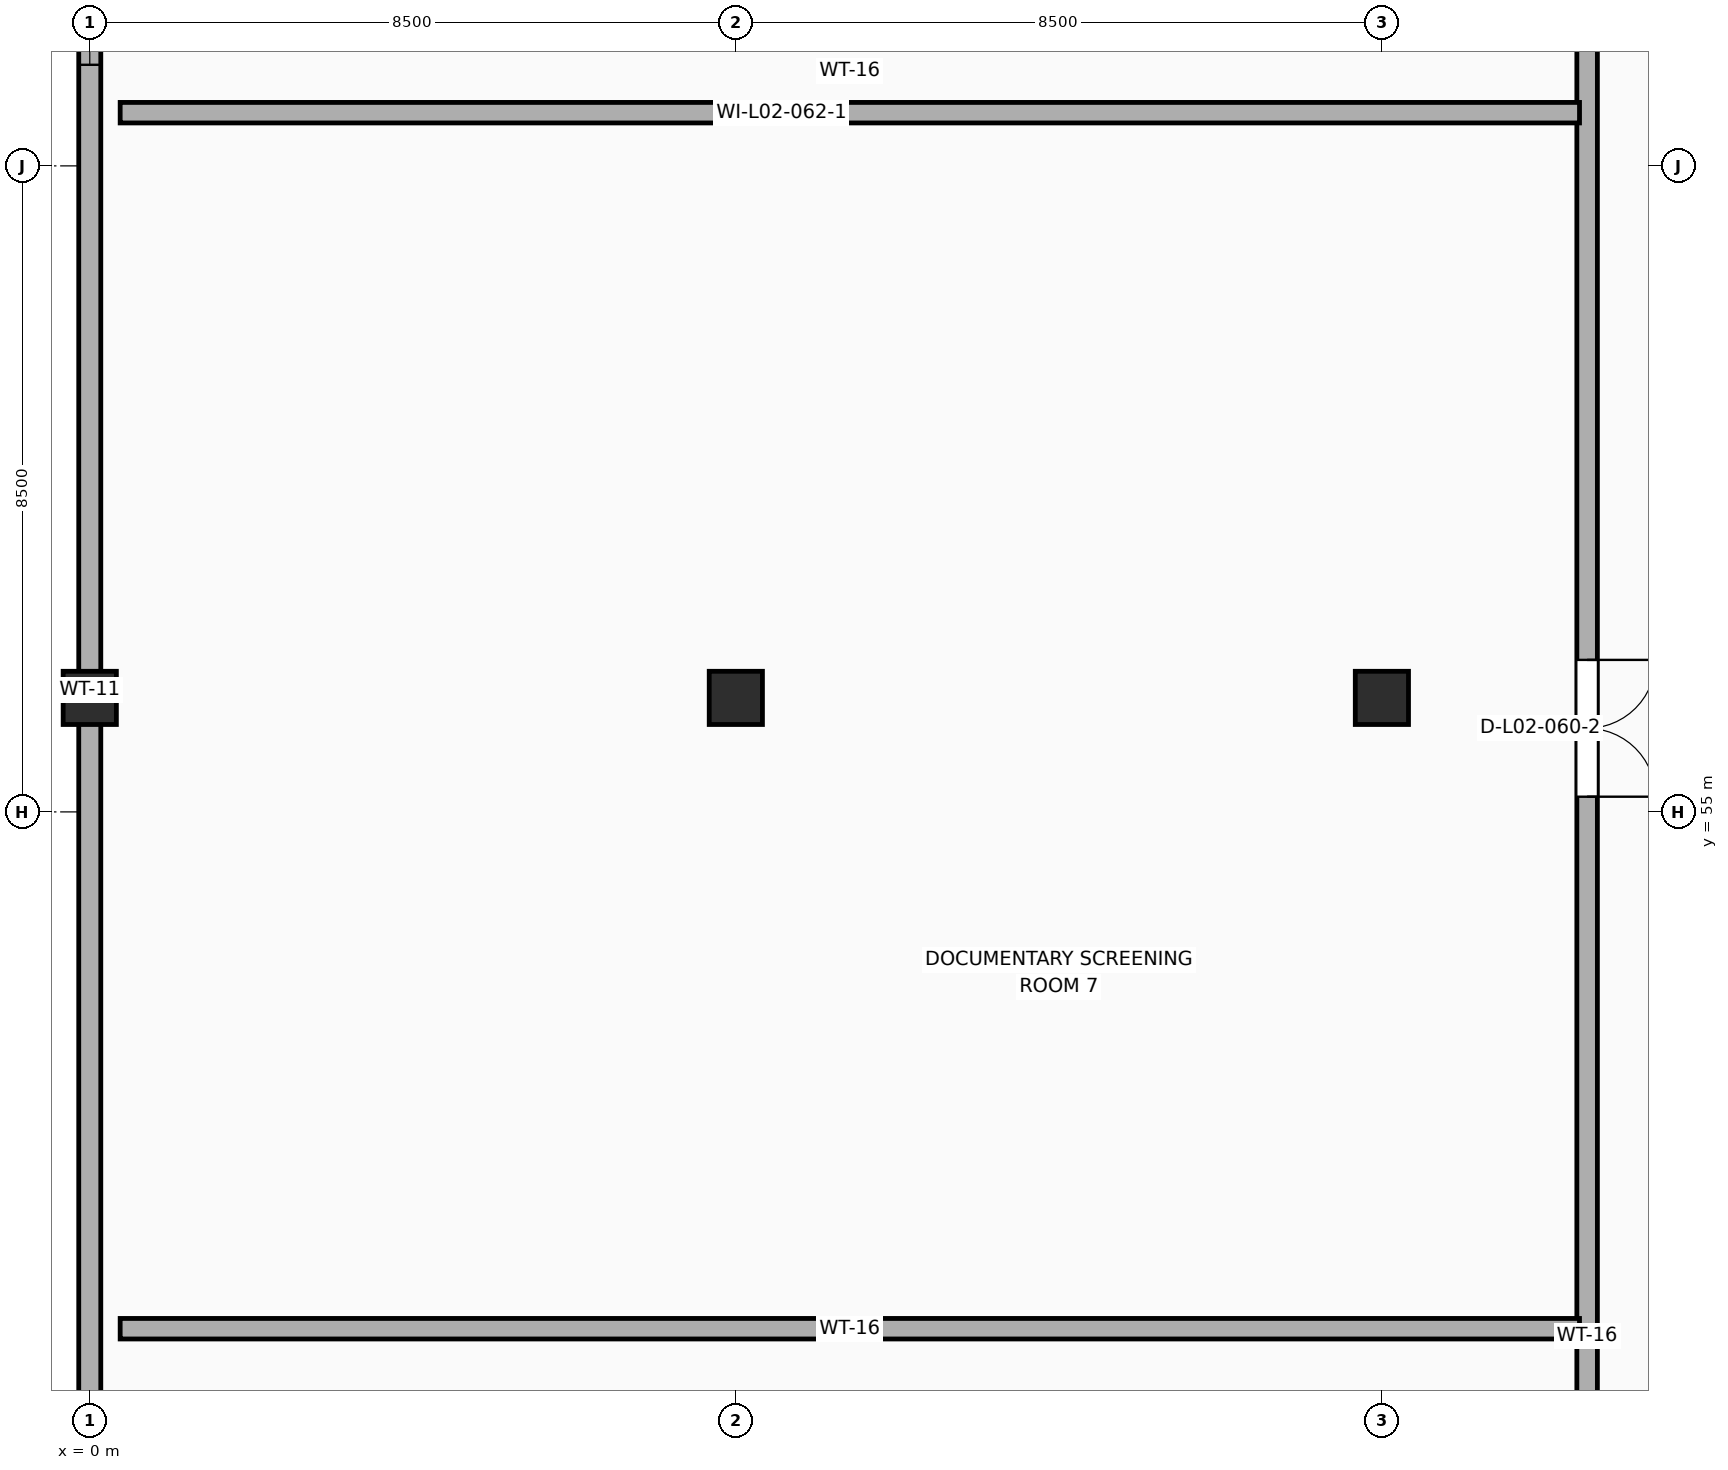
"""IFC4 building model, lengths in metres.
Left out: names, types, materials, properties, quantities, classifications, styles, units other than length and angle.
Written with IfcOpenShell. Run it as: python <this file> out.ifc"""

import sys

from ifc_helpers import new_model, si_unit, direction, frame, frame_2d, origin, origin_2d, place, context, subcontext, project, spatial, rectangle, extrude, element, fill, save


model = new_model("IFC4")
c1 = context("Model", 3, precision=1e-05, world=origin(), true_north=direction((0.0, 1.0)))
c2 = subcontext(c1, "Body", "Model", "MODEL_VIEW")
j1 = project(units=[si_unit("LENGTHUNIT", "METRE"), si_unit("PLANEANGLEUNIT", "RADIAN")], contexts=[c1])
p1 = place(None, origin())
s1 = spatial("IfcSite", under=j1, at=p1, CompositionType="ELEMENT")
p2 = place(p1, origin())
s2 = spatial("IfcBuilding", under=s1, at=p2, CompositionType="ELEMENT")
p3 = place(p2, frame((0.0, 0.0, 10.2)))
s3 = spatial("IfcBuildingStorey", under=s2, at=p3, CompositionType="ELEMENT", Elevation=10.2)
for number, where, z_axis, x_axis in (
    (1, (0.0, 56.5, 0.0), (0.0, 0.0, 1.0), (1.0, 0.0, 0.0)),
    (2, (8.5, 56.5, 0.0), (0.0, 0.0, 1.0), (1.0, 0.0, 0.0)),
    (3, (17.0, 56.5, 0.0), (0.0, 0.0, 1.0), (1.0, 0.0, 0.0)),
):
    element("IfcColumn", number, at=place(p3, frame(where, z_axis=z_axis, x_axis=x_axis)), inside=s3, PredefinedType="COLUMN", context=c2, shape_type="SweptSolid", body=[
        extrude(rectangle(XDim=0.7, YDim=0.7, at=origin_2d()), origin(), (0.0, 0.0, 1.0), 4.54),
    ])
p4 = place(p3, frame((0.0, 32.0, 0.0), z_axis=(0.0, 0.0, 1.0), x_axis=(0.0, 1.0, 0.0)))
e4 = element("IfcWall", 4, at=p4, inside=s3, PredefinedType="STANDARD", context=c2, shape_type="SweptSolid", body=[
    extrude(rectangle(XDim=48.5, YDim=0.29, at=frame_2d((24.25, 0.0))), origin(), (0.0, 0.0, 1.0), 3.68),
])
p5 = place(p4, frame((3.35, 0.0, 2.12)))
e5 = element("IfcOpeningElement", 5, at=p5, cuts=e4, PredefinedType="OPENING", context=c2, shape_type="SweptSolid", body=[
    extrude(rectangle(XDim=3.0, YDim=1.4, at=frame_2d((1.5, 0.7))), frame((0.0, 0.157, 0.0), z_axis=(0.0, -1.0, 0.0), x_axis=(1.0, 0.0, 0.0)), (0.0, 0.0, 1.0), 0.314),
])
p6 = place(p4, frame((32.83, 0.0, 2.12)))
e6 = element("IfcOpeningElement", 6, at=p6, cuts=e4, PredefinedType="OPENING", context=c2, shape_type="SweptSolid", body=[
    extrude(rectangle(XDim=3.0, YDim=1.4, at=frame_2d((1.5, 0.7))), frame((0.0, 0.157, 0.0), z_axis=(0.0, -1.0, 0.0), x_axis=(1.0, 0.0, 0.0)), (0.0, 0.0, 1.0), 0.314),
])
p7 = place(p4, frame((42.15, 0.0, 2.12)))
e7 = element("IfcOpeningElement", 7, at=p7, cuts=e4, PredefinedType="OPENING", context=c2, shape_type="SweptSolid", body=[
    extrude(rectangle(XDim=3.0, YDim=1.4, at=frame_2d((1.5, 0.7))), frame((0.0, 0.157, 0.0), z_axis=(0.0, -1.0, 0.0), x_axis=(1.0, 0.0, 0.0)), (0.0, 0.0, 1.0), 0.314),
])
p8 = place(p3, frame((19.7, 32.2, 0.0), z_axis=(0.0, 0.0, 1.0), x_axis=(0.0, 1.0, 0.0)))
e8 = element("IfcWall", 8, at=p8, inside=s3, PredefinedType="PARTITIONING", context=c2, shape_type="SweptSolid", body=[
    extrude(rectangle(XDim=48.0, YDim=0.27, at=frame_2d((24.0, 0.0))), origin(), (0.0, 0.0, 1.0), 3.68),
])
p9 = place(p8, frame((7.0, 0.0, 0.0)))
e9 = element("IfcOpeningElement", 9, at=p9, cuts=e8, PredefinedType="OPENING", context=c2, shape_type="SweptSolid", body=[
    extrude(rectangle(XDim=1.8, YDim=2.4, at=frame_2d((0.9, 1.2))), frame((0.0, 0.147, 0.0), z_axis=(0.0, -1.0, 0.0), x_axis=(1.0, 0.0, 0.0)), (0.0, 0.0, 1.0), 0.294),
])
p10 = place(p8, frame((23.0, 0.0, 0.0)))
e10 = element("IfcOpeningElement", 10, at=p10, cuts=e8, PredefinedType="OPENING", context=c2, shape_type="SweptSolid", body=[
    extrude(rectangle(XDim=1.8, YDim=2.4, at=frame_2d((0.9, 1.2))), frame((0.0, 0.147, 0.0), z_axis=(0.0, -1.0, 0.0), x_axis=(1.0, 0.0, 0.0)), (0.0, 0.0, 1.0), 0.294),
])
p11 = place(p8, frame((38.0, 0.0, 0.0)))
e11 = element("IfcOpeningElement", 11, at=p11, cuts=e8, PredefinedType="OPENING", context=c2, shape_type="SweptSolid", body=[
    extrude(rectangle(XDim=1.0, YDim=2.15, at=frame_2d((0.5, 1.075))), frame((0.0, 0.147, 0.0), z_axis=(0.0, -1.0, 0.0), x_axis=(1.0, 0.0, 0.0)), (0.0, 0.0, 1.0), 0.294),
])
p12 = place(p3, frame((0.4, 48.2, 0.0), z_axis=(0.0, 0.0, 1.0), x_axis=(1.0, 0.0, 0.0)))
e12 = element("IfcWall", 12, at=p12, inside=s3, PredefinedType="PARTITIONING", context=c2, shape_type="SweptSolid", body=[
    extrude(rectangle(XDim=19.2, YDim=0.27, at=frame_2d((9.6, 0.0))), origin(), (0.0, 0.0, 1.0), 3.728),
])
p13 = place(p3, frame((0.4, 64.2, 0.0), z_axis=(0.0, 0.0, 1.0), x_axis=(1.0, 0.0, 0.0)))
e13 = element("IfcWall", 13, at=p13, inside=s3, PredefinedType="PARTITIONING", context=c2, shape_type="SweptSolid", body=[
    extrude(rectangle(XDim=19.2, YDim=0.27, at=frame_2d((9.6, 0.0))), origin(), (0.0, 0.0, 1.0), 3.828),
])
p14 = place(p13, frame((8.0, 0.0, 1.2)))
e14 = element("IfcOpeningElement", 14, at=p14, cuts=e13, PredefinedType="OPENING", context=c2, shape_type="SweptSolid", body=[
    extrude(rectangle(XDim=1.4, YDim=1.0, at=frame_2d((0.7, 0.5))), frame((0.0, 0.147, 0.0), z_axis=(0.0, -1.0, 0.0), x_axis=(1.0, 0.0, 0.0)), (0.0, 0.0, 1.0), 0.294),
])
p15 = place(p6, origin())
e15 = element("IfcWindow", 15, at=p15, inside=s3, PartitioningType="SINGLE_PANEL", PredefinedType="WINDOW", context=c2, shape_type="SweptSolid", body=[
    extrude(rectangle(XDim=3.0, YDim=1.4, at=frame_2d((1.5, 0.7))), frame((0.0, 0.03, 0.0), z_axis=(0.0, -1.0, 0.0), x_axis=(1.0, 0.0, 0.0)), (0.0, 0.0, 1.0), 0.06),
])
fill(e6, e15)
p16 = place(p10, frame((1.8, 0.0, 0.0), z_axis=(0.0, 0.0, 1.0), x_axis=(-1.0, 0.0, 0.0)))
e16 = element("IfcDoor", 16, at=p16, inside=s3, OperationType="DOUBLE_DOOR_SINGLE_SWING", PredefinedType="DOOR", context=c2, shape_type="SweptSolid", body=[
    extrude(rectangle(XDim=1.8, YDim=2.4, at=frame_2d((0.9, 1.2))), frame((0.0, 0.025, 0.0), z_axis=(0.0, -1.0, 0.0), x_axis=(1.0, 0.0, 0.0)), (0.0, 0.0, 1.0), 0.05),
])
fill(e10, e16)
p17 = place(p14, origin())
e17 = element("IfcWindow", 17, at=p17, inside=s3, PartitioningType="SINGLE_PANEL", PredefinedType="WINDOW", context=c2, shape_type="SweptSolid", body=[
    extrude(rectangle(XDim=1.4, YDim=1.0, at=frame_2d((0.7, 0.5))), frame((0.0, 0.03, 0.0), z_axis=(0.0, -1.0, 0.0), x_axis=(1.0, 0.0, 0.0)), (0.0, 0.0, 1.0), 0.06),
])
fill(e14, e17)
save(model, sys.argv[1])
